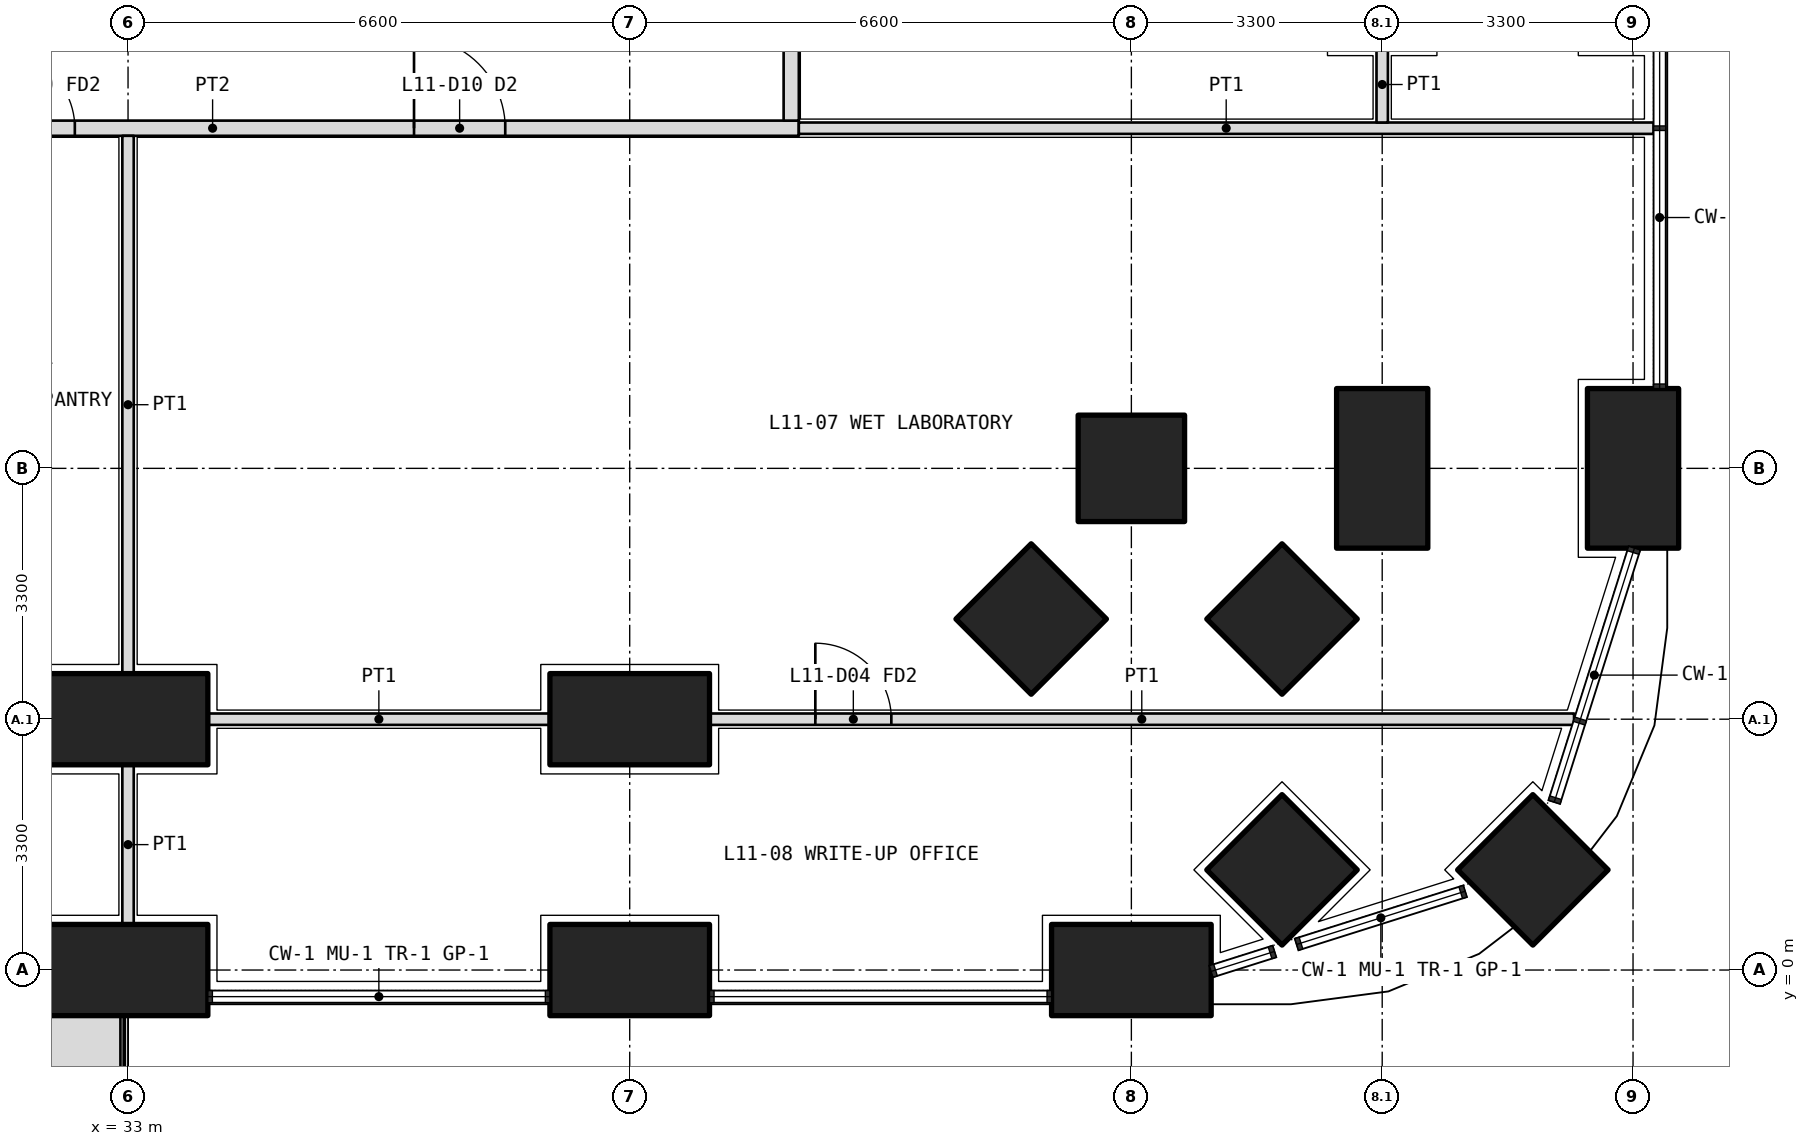
"""IFC4 building model, lengths in metres.
Left out: names, types, materials, properties, quantities, classifications, styles, units other than length and angle.
Written with IfcOpenShell. Run it as: python <this file> out.ifc"""

import sys

from ifc_helpers import new_model, si_unit, direction, frame, frame_2d, origin, origin_2d, place, context, subcontext, project, spatial, polyline, rectangle, outline, extrude, element, fill, save


model = new_model("IFC4")
c1 = context("Model", 3, precision=1e-05, world=origin(), true_north=direction((0.0, 1.0)))
c2 = subcontext(c1, "Body", "Model", "MODEL_VIEW")
j1 = project(units=[si_unit("LENGTHUNIT", "METRE"), si_unit("PLANEANGLEUNIT", "RADIAN")], contexts=[c1])
p1 = place(None, origin())
s1 = spatial("IfcSite", under=j1, at=p1, CompositionType="ELEMENT")
p2 = place(p1, origin())
s2 = spatial("IfcBuilding", under=s1, at=p2, CompositionType="ELEMENT")
p3 = place(p2, frame((0.0, 0.0, 50.7)))
s3 = spatial("IfcBuildingStorey", under=s2, at=p3, CompositionType="ELEMENT", Elevation=50.7)
p4 = place(p3, frame((51.482, 1.318, 0.0), z_axis=(0.0, 0.0, 1.0), x_axis=(0.707106781187, 0.707106781187, 0.0)))
e1 = element("IfcColumn", 1, at=p4, inside=s3, PredefinedType="COLUMN", context=c2, shape_type="SweptSolid", body=[
    extrude(rectangle(XDim=1.4, YDim=1.4, at=origin_2d()), origin(), (0.0, 0.0, 1.0), 4.2),
])
for number, where, z_axis, x_axis in (
    (2, (33.0, 0.0, 0.0), (0.0, 0.0, 1.0), (1.0, 0.0, 0.0)),
    (3, (39.6, 0.0, 0.0), (0.0, 0.0, 1.0), (1.0, 0.0, 0.0)),
    (4, (46.2, 0.0, 0.0), (0.0, 0.0, 1.0), (1.0, 0.0, 0.0)),
    (5, (52.8, 6.6, 0.0), (0.0, 0.0, 1.0), (0.0, 1.0, 0.0)),
):
    element("IfcColumn", number, at=place(p3, frame(where, z_axis=z_axis, x_axis=x_axis)), inside=s3, PredefinedType="COLUMN", context=c2, shape_type="SweptSolid", body=[
        extrude(rectangle(XDim=2.1, YDim=1.2, at=origin_2d()), origin(), (0.0, 0.0, 1.0), 4.2),
    ])
for number, where, z_axis, x_axis in (
    (6, (46.2, 6.6, 0.0), (0.0, 0.0, 1.0), (1.0, 0.0, 0.0)),
    (7, (48.182, 1.318, 0.0), (0.0, 0.0, 1.0), (0.707, 0.707, 0.0)),
):
    element("IfcColumn", number, at=place(p3, frame(where, z_axis=z_axis, x_axis=x_axis)), inside=s3, PredefinedType="COLUMN", context=c2, shape_type="SweptSolid", body=[
        extrude(rectangle(XDim=1.4, YDim=1.4, at=origin_2d()), origin(), (0.0, 0.0, 1.0), 4.2),
    ])
p5 = place(p3, frame((49.5, 6.6, 0.0), z_axis=(0.0, 0.0, 1.0), x_axis=(0.0, 1.0, 0.0)))
e8 = element("IfcColumn", 8, at=p5, inside=s3, PredefinedType="COLUMN", context=c2, shape_type="SweptSolid", body=[
    extrude(rectangle(XDim=2.1, YDim=1.2, at=origin_2d()), origin(), (0.0, 0.0, 1.0), 4.2),
])
p6 = place(p3, frame((48.182, 4.618, 0.0), z_axis=(0.0, 0.0, 1.0), x_axis=(0.707106781187, 0.707106781187, 0.0)))
e9 = element("IfcColumn", 9, at=p6, inside=s3, PredefinedType="COLUMN", context=c2, shape_type="SweptSolid", body=[
    extrude(rectangle(XDim=1.4, YDim=1.4, at=origin_2d()), origin(), (0.0, 0.0, 1.0), 4.2),
])
for number, where, z_axis, x_axis in (
    (10, (33.0, 3.3, 0.0), (0.0, 0.0, 1.0), (1.0, 0.0, 0.0)),
    (11, (39.6, 3.3, 0.0), (0.0, 0.0, 1.0), (1.0, 0.0, 0.0)),
):
    element("IfcColumn", number, at=place(p3, frame(where, z_axis=z_axis, x_axis=x_axis)), inside=s3, PredefinedType="COLUMN", context=c2, shape_type="SweptSolid", body=[
        extrude(rectangle(XDim=2.1, YDim=1.2, at=origin_2d()), origin(), (0.0, 0.0, 1.0), 4.2),
    ])
p7 = place(p3, frame((44.882, 4.618, 0.0), z_axis=(0.0, 0.0, 1.0), x_axis=(0.707106781187, 0.707106781187, 0.0)))
e12 = element("IfcColumn", 12, at=p7, inside=s3, PredefinedType="COLUMN", context=c2, shape_type="SweptSolid", body=[
    extrude(rectangle(XDim=1.4, YDim=1.4, at=origin_2d()), origin(), (0.0, 0.0, 1.0), 4.2),
])
p8 = place(p3, origin())
e13 = element("IfcWall", 13, at=p8, inside=s3, PredefinedType="USERDEFINED", context=c2, shape_type="SweptSolid", body=[
    extrude(outline(polyline([(23.85, -1.55), (32.9, -1.55), (32.9, -0.55), (23.85, -0.55), (23.85, -1.55)]), holes=[polyline([(24.0, -1.4), (32.75, -1.4), (32.75, -0.7), (24.0, -0.7), (24.0, -1.4)])]), origin(), (0.0, 0.0, 1.0), 1.05),
])
p9 = place(p3, frame((26.4, 11.075, 0.0), z_axis=(0.0, 0.0, 1.0), x_axis=(1.0, 0.0, 0.0)))
e14 = element("IfcWall", 14, at=p9, inside=s3, PredefinedType="PARTITIONING", context=c2, shape_type="SweptSolid", body=[
    extrude(rectangle(XDim=15.425, YDim=0.2, at=frame_2d((7.712, 0.0))), origin(), (0.0, 0.0, 1.0), 2.85),
])
p10 = place(p9, frame((1.6, 0.0, 0.0)))
e15 = element("IfcOpeningElement", 15, at=p10, cuts=e14, PredefinedType="OPENING", context=c2, shape_type="SweptSolid", body=[
    extrude(rectangle(XDim=1.0, YDim=2.1, at=frame_2d((0.5, 1.05))), frame((0.0, 0.11, 0.0), z_axis=(0.0, -1.0, 0.0), x_axis=(1.0, 0.0, 0.0)), (0.0, 0.0, 1.0), 0.22),
])
p11 = place(p9, frame((4.9, 0.0, 0.0)))
e16 = element("IfcOpeningElement", 16, at=p11, cuts=e14, PredefinedType="OPENING", context=c2, shape_type="SweptSolid", body=[
    extrude(rectangle(XDim=1.0, YDim=2.1, at=frame_2d((0.5, 1.05))), frame((0.0, 0.11, 0.0), z_axis=(0.0, -1.0, 0.0), x_axis=(1.0, 0.0, 0.0)), (0.0, 0.0, 1.0), 0.22),
])
p12 = place(p9, frame((10.363, 0.0, 0.0)))
e17 = element("IfcOpeningElement", 17, at=p12, cuts=e14, PredefinedType="OPENING", context=c2, shape_type="SweptSolid", body=[
    extrude(rectangle(XDim=1.2, YDim=2.1, at=frame_2d((0.6, 1.05))), frame((0.0, 0.11, 0.0), z_axis=(0.0, -1.0, 0.0), x_axis=(1.0, 0.0, 0.0)), (0.0, 0.0, 1.0), 0.22),
])
p13 = place(p3, frame((41.725, 11.175, 0.0), z_axis=(0.0, 0.0, 1.0), x_axis=(0.0, 1.0, 0.0)))
e18 = element("IfcWall", 18, at=p13, inside=s3, PredefinedType="PARTITIONING", context=c2, shape_type="SweptSolid", body=[
    extrude(rectangle(XDim=23.85, YDim=0.2, at=frame_2d((11.925, 0.0))), origin(), (0.0, 0.0, 1.0), 2.85),
])
p14 = place(p13, frame((2.012, 0.0, 0.0)))
e19 = element("IfcOpeningElement", 19, at=p14, cuts=e18, PredefinedType="OPENING", context=c2, shape_type="SweptSolid", body=[
    extrude(rectangle(XDim=1.2, YDim=2.1, at=frame_2d((0.6, 1.05))), frame((0.0, 0.11, 0.0), z_axis=(0.0, -1.0, 0.0), x_axis=(1.0, 0.0, 0.0)), (0.0, 0.0, 1.0), 0.22),
])
p15 = place(p13, frame((6.475, 0.0, 0.0)))
e20 = element("IfcOpeningElement", 20, at=p15, cuts=e18, PredefinedType="OPENING", context=c2, shape_type="SweptSolid", body=[
    extrude(rectangle(XDim=1.0, YDim=2.1, at=frame_2d((0.5, 1.05))), frame((0.0, 0.11, 0.0), z_axis=(0.0, -1.0, 0.0), x_axis=(1.0, 0.0, 0.0)), (0.0, 0.0, 1.0), 0.22),
])
p16 = place(p13, frame((9.725, 0.0, 0.0)))
e21 = element("IfcOpeningElement", 21, at=p16, cuts=e18, PredefinedType="OPENING", context=c2, shape_type="SweptSolid", body=[
    extrude(rectangle(XDim=1.0, YDim=2.1, at=frame_2d((0.5, 1.05))), frame((0.0, 0.11, 0.0), z_axis=(0.0, -1.0, 0.0), x_axis=(1.0, 0.0, 0.0)), (0.0, 0.0, 1.0), 0.22),
])
p17 = place(p13, frame((13.075, 0.0, 0.0)))
e22 = element("IfcOpeningElement", 22, at=p17, cuts=e18, PredefinedType="OPENING", context=c2, shape_type="SweptSolid", body=[
    extrude(rectangle(XDim=0.9, YDim=2.1, at=frame_2d((0.45, 1.05))), frame((0.0, 0.11, 0.0), z_axis=(0.0, -1.0, 0.0), x_axis=(1.0, 0.0, 0.0)), (0.0, 0.0, 1.0), 0.22),
])
p18 = place(p13, frame((16.375, 0.0, 0.0)))
e23 = element("IfcOpeningElement", 23, at=p18, cuts=e18, PredefinedType="OPENING", context=c2, shape_type="SweptSolid", body=[
    extrude(rectangle(XDim=1.0, YDim=2.1, at=frame_2d((0.5, 1.05))), frame((0.0, 0.11, 0.0), z_axis=(0.0, -1.0, 0.0), x_axis=(1.0, 0.0, 0.0)), (0.0, 0.0, 1.0), 0.22),
])
p19 = place(p13, frame((20.738, 0.0, 0.0)))
e24 = element("IfcOpeningElement", 24, at=p19, cuts=e18, PredefinedType="OPENING", context=c2, shape_type="SweptSolid", body=[
    extrude(rectangle(XDim=1.0, YDim=2.1, at=frame_2d((0.5, 1.05))), frame((0.0, 0.11, 0.0), z_axis=(0.0, -1.0, 0.0), x_axis=(1.0, 0.0, 0.0)), (0.0, 0.0, 1.0), 0.22),
])
p20 = place(p3, frame((53.07, 11.075, 0.0), z_axis=(0.0, 0.0, 1.0), x_axis=(-1.0, 0.0, 0.0)))
e25 = element("IfcWall", 25, at=p20, inside=s3, PredefinedType="PARTITIONING", context=c2, shape_type="SweptSolid", body=[
    extrude(rectangle(XDim=11.245, YDim=0.15, at=frame_2d((5.623, 0.0))), origin(), (0.0, 0.0, 1.0), 2.7),
])
p21 = place(p3, frame((34.05, 3.3, 0.0), z_axis=(0.0, 0.0, 1.0), x_axis=(1.0, 0.0, 0.0)))
e26 = element("IfcWall", 26, at=p21, inside=s3, PredefinedType="PARTITIONING", context=c2, shape_type="SweptSolid", body=[
    extrude(rectangle(XDim=4.5, YDim=0.15, at=frame_2d((2.25, 0.0))), origin(), (0.0, 0.0, 1.0), 3.9),
])
p22 = place(p3, frame((40.65, 3.3, 0.0), z_axis=(0.0, 0.0, 1.0), x_axis=(1.0, 0.0, 0.0)))
e27 = element("IfcWall", 27, at=p22, inside=s3, PredefinedType="PARTITIONING", context=c2, shape_type="SweptSolid", body=[
    extrude(rectangle(XDim=11.374, YDim=0.15, at=frame_2d((5.687, 0.0))), origin(), (0.0, 0.0, 1.0), 2.7),
])
p23 = place(p22, frame((1.392, 0.0, 0.0)))
e28 = element("IfcOpeningElement", 28, at=p23, cuts=e27, PredefinedType="OPENING", context=c2, shape_type="SweptSolid", body=[
    extrude(rectangle(XDim=1.0, YDim=2.1, at=frame_2d((0.5, 1.05))), frame((0.0, 0.085, 0.0), z_axis=(0.0, -1.0, 0.0), x_axis=(1.0, 0.0, 0.0)), (0.0, 0.0, 1.0), 0.17),
])
p24 = place(p3, frame((33.0, 0.6, 0.0), z_axis=(0.0, 0.0, 1.0), x_axis=(0.0, 1.0, 0.0)))
e29 = element("IfcWall", 29, at=p24, inside=s3, PredefinedType="PARTITIONING", context=c2, shape_type="SweptSolid", body=[
    extrude(rectangle(XDim=2.1, YDim=0.15, at=frame_2d((1.05, 0.0))), origin(), (0.0, 0.0, 1.0), 2.85),
])
p25 = place(p3, frame((33.0, 3.9, 0.0), z_axis=(0.0, 0.0, 1.0), x_axis=(0.0, 1.0, 0.0)))
e30 = element("IfcWall", 30, at=p25, inside=s3, PredefinedType="PARTITIONING", context=c2, shape_type="SweptSolid", body=[
    extrude(rectangle(XDim=7.075, YDim=0.15, at=frame_2d((3.538, 0.0))), origin(), (0.0, 0.0, 1.0), 2.85),
])
p26 = place(p3, frame((49.5, 11.15, 0.0), z_axis=(0.0, 0.0, 1.0), x_axis=(0.0, 1.0, 0.0)))
e31 = element("IfcWall", 31, at=p26, inside=s3, PredefinedType="PARTITIONING", context=c2, shape_type="SweptSolid", body=[
    extrude(rectangle(XDim=1.0, YDim=0.15, at=frame_2d((0.5, 0.0))), origin(), (0.0, 0.0, 1.0), 3.9),
])
p27 = place(p11, origin())
e32 = element("IfcDoor", 32, at=p27, inside=s3, OperationType="SINGLE_SWING_LEFT", PredefinedType="DOOR", context=c2, shape_type="SweptSolid", body=[
    extrude(rectangle(XDim=1.0, YDim=2.1, at=frame_2d((0.5, 1.05))), frame((0.0, 0.025, 0.0), z_axis=(0.0, -1.0, 0.0), x_axis=(1.0, 0.0, 0.0)), (0.0, 0.0, 1.0), 0.05),
])
fill(e16, e32)
p28 = place(p12, origin())
e33 = element("IfcDoor", 33, at=p28, inside=s3, OperationType="DOUBLE_DOOR_SINGLE_SWING", PredefinedType="DOOR", context=c2, shape_type="SweptSolid", body=[
    extrude(rectangle(XDim=1.2, YDim=2.1, at=frame_2d((0.6, 1.05))), frame((0.0, 0.025, 0.0), z_axis=(0.0, -1.0, 0.0), x_axis=(1.0, 0.0, 0.0)), (0.0, 0.0, 1.0), 0.05),
])
fill(e17, e33)
p29 = place(p23, origin())
e34 = element("IfcDoor", 34, at=p29, inside=s3, OperationType="SINGLE_SWING_LEFT", PredefinedType="DOOR", context=c2, shape_type="SweptSolid", body=[
    extrude(rectangle(XDim=1.0, YDim=2.1, at=frame_2d((0.5, 1.05))), frame((0.0, 0.025, 0.0), z_axis=(0.0, -1.0, 0.0), x_axis=(1.0, 0.0, 0.0)), (0.0, 0.0, 1.0), 0.05),
])
fill(e28, e34)
save(model, sys.argv[1])
